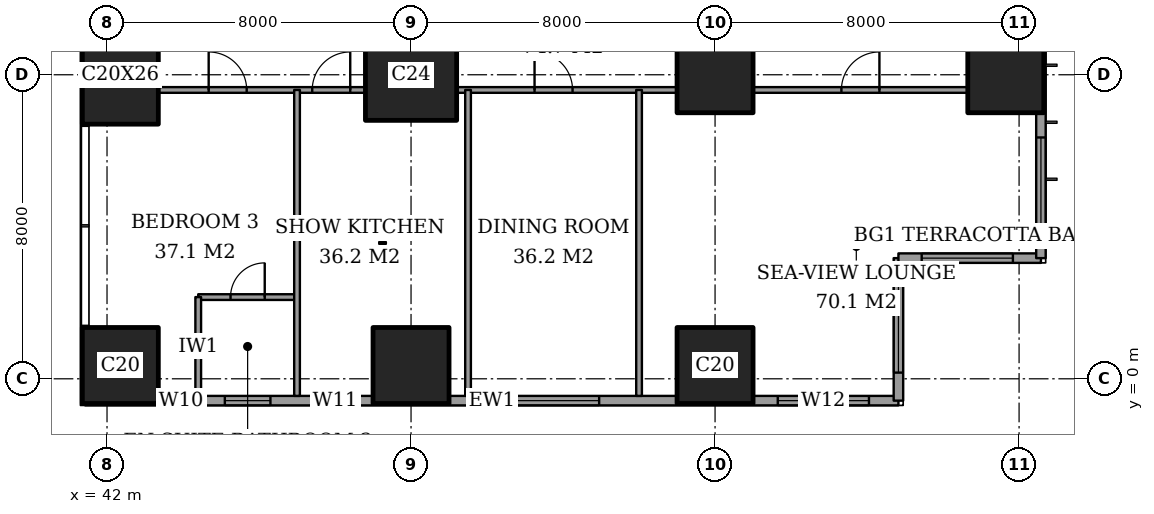
"""IFC4 building model, lengths in metres.
Left out: names, types, materials, properties, quantities, classifications, styles, units other than length and angle.
Written with IfcOpenShell. Run it as: python <this file> out.ifc"""

import sys

from ifc_helpers import new_model, si_unit, direction, frame, frame_2d, origin, origin_2d, place, context, subcontext, project, spatial, rectangle, extrude, element, fill, save


model = new_model("IFC4")
c1 = context("Model", 3, precision=1e-05, world=origin(), true_north=direction((0.0, 1.0)))
c2 = subcontext(c1, "Body", "Model", "MODEL_VIEW")
j1 = project(units=[si_unit("LENGTHUNIT", "METRE"), si_unit("PLANEANGLEUNIT", "RADIAN")], contexts=[c1])
p1 = place(None, origin())
s1 = spatial("IfcSite", under=j1, at=p1, CompositionType="ELEMENT")
p2 = place(p1, origin())
s2 = spatial("IfcBuilding", under=s1, at=p2, CompositionType="ELEMENT")
p3 = place(p2, frame((0.0, 0.0, 114.2)))
s3 = spatial("IfcBuildingStorey", under=s2, at=p3, CompositionType="ELEMENT", Elevation=114.2)
p4 = place(p3, frame((42.35, 0.35, 0.0), z_axis=(0.0, 0.0, 1.0), x_axis=(1.0, 0.0, 0.0)))
e1 = element("IfcColumn", 1, at=p4, inside=s3, PredefinedType="COLUMN", context=c2, shape_type="SweptSolid", body=[
    extrude(rectangle(XDim=2.0, YDim=2.0, at=origin_2d()), origin(), (0.0, 0.0, 1.0), 3.6),
])
p5 = place(p3, frame((42.35, 8.0, 0.0), z_axis=(0.0, 0.0, 1.0), x_axis=(1.0, 0.0, 0.0)))
e2 = element("IfcColumn", 2, at=p5, inside=s3, PredefinedType="COLUMN", context=c2, shape_type="SweptSolid", body=[
    extrude(rectangle(XDim=2.0, YDim=2.6, at=origin_2d()), origin(), (0.0, 0.0, 1.0), 3.6),
])
p6 = place(p3, frame((50.0, 0.35, 0.0), z_axis=(0.0, 0.0, 1.0), x_axis=(1.0, 0.0, 0.0)))
e3 = element("IfcColumn", 3, at=p6, inside=s3, PredefinedType="COLUMN", context=c2, shape_type="SweptSolid", body=[
    extrude(rectangle(XDim=2.0, YDim=2.0, at=origin_2d()), origin(), (0.0, 0.0, 1.0), 3.6),
])
p7 = place(p3, frame((50.0, 8.0, 0.0), z_axis=(0.0, 0.0, 1.0), x_axis=(1.0, 0.0, 0.0)))
e4 = element("IfcColumn", 4, at=p7, inside=s3, PredefinedType="COLUMN", context=c2, shape_type="SweptSolid", body=[
    extrude(rectangle(XDim=2.4, YDim=2.4, at=origin_2d()), origin(), (0.0, 0.0, 1.0), 3.6),
])
for number, where, z_axis, x_axis in (
    (5, (58.0, 0.35, 0.0), (0.0, 0.0, 1.0), (1.0, 0.0, 0.0)),
    (6, (58.0, 8.0, 0.0), (0.0, 0.0, 1.0), (1.0, 0.0, 0.0)),
    (7, (65.65, 8.0, 0.0), (0.0, 0.0, 1.0), (1.0, 0.0, 0.0)),
):
    element("IfcColumn", number, at=place(p3, frame(where, z_axis=z_axis, x_axis=x_axis)), inside=s3, PredefinedType="COLUMN", context=c2, shape_type="SweptSolid", body=[
        extrude(rectangle(XDim=2.0, YDim=2.0, at=origin_2d()), origin(), (0.0, 0.0, 1.0), 3.6),
    ])
p8 = place(p3, frame((41.425, -0.575, 0.0), z_axis=(0.0, 0.0, 1.0), x_axis=(1.0, 0.0, 0.0)))
e8 = element("IfcWall", 8, at=p8, inside=s3, PredefinedType="SOLIDWALL", context=c2, shape_type="SweptSolid", body=[
    extrude(rectangle(XDim=21.4, YDim=0.25, at=frame_2d((10.7, 0.0))), origin(), (0.0, 0.0, 1.0), 3.6),
])
p9 = place(p8, frame((2.225, 0.0, 0.4)))
e9 = element("IfcOpeningElement", 9, at=p9, cuts=e8, PredefinedType="OPENING", context=c2, shape_type="SweptSolid", body=[
    extrude(rectangle(XDim=0.6, YDim=2.2, at=frame_2d((0.3, 1.1))), frame((0.0, 0.135, 0.0), z_axis=(0.0, -1.0, 0.0), x_axis=(1.0, 0.0, 0.0)), (0.0, 0.0, 1.0), 0.27),
])
p10 = place(p8, frame((3.675, 0.0, 0.4)))
e10 = element("IfcOpeningElement", 10, at=p10, cuts=e8, PredefinedType="OPENING", context=c2, shape_type="SweptSolid", body=[
    extrude(rectangle(XDim=1.2, YDim=2.2, at=frame_2d((0.6, 1.1))), frame((0.0, 0.135, 0.0), z_axis=(0.0, -1.0, 0.0), x_axis=(1.0, 0.0, 0.0)), (0.0, 0.0, 1.0), 0.27),
])
p11 = place(p8, frame((5.975, 0.0, 0.4)))
e11 = element("IfcOpeningElement", 11, at=p11, cuts=e8, PredefinedType="OPENING", context=c2, shape_type="SweptSolid", body=[
    extrude(rectangle(XDim=1.2, YDim=2.2, at=frame_2d((0.6, 1.1))), frame((0.0, 0.135, 0.0), z_axis=(0.0, -1.0, 0.0), x_axis=(1.0, 0.0, 0.0)), (0.0, 0.0, 1.0), 0.27),
])
p12 = place(p8, frame((11.125, 0.0, 0.4)))
e12 = element("IfcOpeningElement", 12, at=p12, cuts=e8, PredefinedType="OPENING", context=c2, shape_type="SweptSolid", body=[
    extrude(rectangle(XDim=2.4, YDim=2.2, at=frame_2d((1.2, 1.1))), frame((0.0, 0.135, 0.0), z_axis=(0.0, -1.0, 0.0), x_axis=(1.0, 0.0, 0.0)), (0.0, 0.0, 1.0), 0.27),
])
p13 = place(p8, frame((18.225, 0.0, 0.4)))
e13 = element("IfcOpeningElement", 13, at=p13, cuts=e8, PredefinedType="OPENING", context=c2, shape_type="SweptSolid", body=[
    extrude(rectangle(XDim=2.4, YDim=2.2, at=frame_2d((1.2, 1.1))), frame((0.0, 0.135, 0.0), z_axis=(0.0, -1.0, 0.0), x_axis=(1.0, 0.0, 0.0)), (0.0, 0.0, 1.0), 0.27),
])
p14 = place(p3, frame((62.825, -0.575, 0.0), z_axis=(0.0, 0.0, 1.0), x_axis=(0.0, 1.0, 0.0)))
e14 = element("IfcWall", 14, at=p14, inside=s3, PredefinedType="SOLIDWALL", context=c2, shape_type="SweptSolid", body=[
    extrude(rectangle(XDim=3.75, YDim=0.25, at=frame_2d((1.875, 0.0))), origin(), (0.0, 0.0, 1.0), 3.6),
])
p15 = place(p14, frame((0.738, 0.0, 0.4)))
e15 = element("IfcOpeningElement", 15, at=p15, cuts=e14, PredefinedType="OPENING", context=c2, shape_type="SweptSolid", body=[
    extrude(rectangle(XDim=2.4, YDim=2.2, at=frame_2d((1.2, 1.1))), frame((0.0, 0.135, 0.0), z_axis=(0.0, -1.0, 0.0), x_axis=(1.0, 0.0, 0.0)), (0.0, 0.0, 1.0), 0.27),
])
p16 = place(p3, frame((62.825, 3.175, 0.0), z_axis=(0.0, 0.0, 1.0), x_axis=(1.0, 0.0, 0.0)))
e16 = element("IfcWall", 16, at=p16, inside=s3, PredefinedType="SOLIDWALL", context=c2, shape_type="SweptSolid", body=[
    extrude(rectangle(XDim=3.75, YDim=0.25, at=frame_2d((1.875, 0.0))), origin(), (0.0, 0.0, 1.0), 3.6),
])
p17 = place(p16, frame((0.613, 0.0, 0.4)))
e17 = element("IfcOpeningElement", 17, at=p17, cuts=e16, PredefinedType="OPENING", context=c2, shape_type="SweptSolid", body=[
    extrude(rectangle(XDim=2.4, YDim=2.2, at=frame_2d((1.2, 1.1))), frame((0.0, 0.135, 0.0), z_axis=(0.0, -1.0, 0.0), x_axis=(1.0, 0.0, 0.0)), (0.0, 0.0, 1.0), 0.27),
])
p18 = place(p3, frame((66.575, 3.175, 0.0), z_axis=(0.0, 0.0, 1.0), x_axis=(0.0, 1.0, 0.0)))
e18 = element("IfcWall", 18, at=p18, inside=s3, PredefinedType="SOLIDWALL", context=c2, shape_type="SweptSolid", body=[
    extrude(rectangle(XDim=41.65, YDim=0.25, at=frame_2d((20.825, 0.0))), origin(), (0.0, 0.0, 1.0), 3.6),
])
p19 = place(p18, frame((0.775, 0.0, 0.4)))
e19 = element("IfcOpeningElement", 19, at=p19, cuts=e18, PredefinedType="OPENING", context=c2, shape_type="SweptSolid", body=[
    extrude(rectangle(XDim=2.4, YDim=2.2, at=frame_2d((1.2, 1.1))), frame((0.0, 0.135, 0.0), z_axis=(0.0, -1.0, 0.0), x_axis=(1.0, 0.0, 0.0)), (0.0, 0.0, 1.0), 0.27),
])
p20 = place(p18, frame((6.1, 0.0, 0.4)))
e20 = element("IfcOpeningElement", 20, at=p20, cuts=e18, PredefinedType="OPENING", context=c2, shape_type="SweptSolid", body=[
    extrude(rectangle(XDim=1.2, YDim=2.2, at=frame_2d((0.6, 1.1))), frame((0.0, 0.135, 0.0), z_axis=(0.0, -1.0, 0.0), x_axis=(1.0, 0.0, 0.0)), (0.0, 0.0, 1.0), 0.27),
])
p21 = place(p18, frame((8.275, 0.0, 0.4)))
e21 = element("IfcOpeningElement", 21, at=p21, cuts=e18, PredefinedType="OPENING", context=c2, shape_type="SweptSolid", body=[
    extrude(rectangle(XDim=2.4, YDim=2.2, at=frame_2d((1.2, 1.1))), frame((0.0, 0.135, 0.0), z_axis=(0.0, -1.0, 0.0), x_axis=(1.0, 0.0, 0.0)), (0.0, 0.0, 1.0), 0.27),
])
p22 = place(p18, frame((15.775, 0.0, 0.4)))
e22 = element("IfcOpeningElement", 22, at=p22, cuts=e18, PredefinedType="OPENING", context=c2, shape_type="SweptSolid", body=[
    extrude(rectangle(XDim=2.4, YDim=2.2, at=frame_2d((1.2, 1.1))), frame((0.0, 0.135, 0.0), z_axis=(0.0, -1.0, 0.0), x_axis=(1.0, 0.0, 0.0)), (0.0, 0.0, 1.0), 0.27),
])
p23 = place(p18, frame((23.475, 0.0, 0.4)))
e23 = element("IfcOpeningElement", 23, at=p23, cuts=e18, PredefinedType="OPENING", context=c2, shape_type="SweptSolid", body=[
    extrude(rectangle(XDim=2.4, YDim=2.2, at=frame_2d((1.2, 1.1))), frame((0.0, 0.135, 0.0), z_axis=(0.0, -1.0, 0.0), x_axis=(1.0, 0.0, 0.0)), (0.0, 0.0, 1.0), 0.27),
])
p24 = place(p18, frame((30.975, 0.0, 0.4)))
e24 = element("IfcOpeningElement", 24, at=p24, cuts=e18, PredefinedType="OPENING", context=c2, shape_type="SweptSolid", body=[
    extrude(rectangle(XDim=2.4, YDim=2.2, at=frame_2d((1.2, 1.1))), frame((0.0, 0.135, 0.0), z_axis=(0.0, -1.0, 0.0), x_axis=(1.0, 0.0, 0.0)), (0.0, 0.0, 1.0), 0.27),
])
p25 = place(p18, frame((34.5, 0.0, 0.4)))
e25 = element("IfcOpeningElement", 25, at=p25, cuts=e18, PredefinedType="OPENING", context=c2, shape_type="SweptSolid", body=[
    extrude(rectangle(XDim=1.2, YDim=2.2, at=frame_2d((0.6, 1.1))), frame((0.0, 0.135, 0.0), z_axis=(0.0, -1.0, 0.0), x_axis=(1.0, 0.0, 0.0)), (0.0, 0.0, 1.0), 0.27),
])
p26 = place(p18, frame((38.475, 0.0, 0.4)))
e26 = element("IfcOpeningElement", 26, at=p26, cuts=e18, PredefinedType="OPENING", context=c2, shape_type="SweptSolid", body=[
    extrude(rectangle(XDim=2.4, YDim=2.2, at=frame_2d((1.2, 1.1))), frame((0.0, 0.135, 0.0), z_axis=(0.0, -1.0, 0.0), x_axis=(1.0, 0.0, 0.0)), (0.0, 0.0, 1.0), 0.27),
])
p27 = place(p3, frame((44.4, 2.15, 0.0), z_axis=(0.0, 0.0, 1.0), x_axis=(1.0, 0.0, 0.0)))
e27 = element("IfcWall", 27, at=p27, inside=s3, PredefinedType="PARTITIONING", context=c2, shape_type="SweptSolid", body=[
    extrude(rectangle(XDim=2.6, YDim=0.15, at=frame_2d((1.3, 0.0))), origin(), (0.0, 0.0, 1.0), 3.35),
])
p28 = place(p27, frame((0.85, 0.0, 0.0)))
e28 = element("IfcOpeningElement", 28, at=p28, cuts=e27, PredefinedType="OPENING", context=c2, shape_type="SweptSolid", body=[
    extrude(rectangle(XDim=0.9, YDim=2.1, at=frame_2d((0.45, 1.05))), frame((0.0, 0.085, 0.0), z_axis=(0.0, -1.0, 0.0), x_axis=(1.0, 0.0, 0.0)), (0.0, 0.0, 1.0), 0.17),
])
p29 = place(p3, frame((43.35, 7.6, 0.0), z_axis=(0.0, 0.0, 1.0), x_axis=(1.0, 0.0, 0.0)))
e29 = element("IfcWall", 29, at=p29, inside=s3, PredefinedType="PARTITIONING", context=c2, shape_type="SweptSolid", body=[
    extrude(rectangle(XDim=5.45, YDim=0.15, at=frame_2d((2.725, 0.0))), origin(), (0.0, 0.0, 1.0), 3.35),
])
p30 = place(p29, frame((4.05, 0.0, 0.0)))
e30 = element("IfcOpeningElement", 30, at=p30, cuts=e29, PredefinedType="OPENING", context=c2, shape_type="SweptSolid", body=[
    extrude(rectangle(XDim=1.0, YDim=2.1, at=frame_2d((0.5, 1.05))), frame((0.0, 0.085, 0.0), z_axis=(0.0, -1.0, 0.0), x_axis=(1.0, 0.0, 0.0)), (0.0, 0.0, 1.0), 0.17),
])
p31 = place(p29, frame((1.325, 0.0, 0.0)))
e31 = element("IfcOpeningElement", 31, at=p31, cuts=e29, PredefinedType="OPENING", context=c2, shape_type="SweptSolid", body=[
    extrude(rectangle(XDim=1.0, YDim=2.1, at=frame_2d((0.5, 1.05))), frame((0.0, 0.085, 0.0), z_axis=(0.0, -1.0, 0.0), x_axis=(1.0, 0.0, 0.0)), (0.0, 0.0, 1.0), 0.17),
])
p32 = place(p3, frame((51.2, 7.6, 0.0), z_axis=(0.0, 0.0, 1.0), x_axis=(1.0, 0.0, 0.0)))
e32 = element("IfcWall", 32, at=p32, inside=s3, PredefinedType="PARTITIONING", context=c2, shape_type="SweptSolid", body=[
    extrude(rectangle(XDim=5.8, YDim=0.15, at=frame_2d((2.9, 0.0))), origin(), (0.0, 0.0, 1.0), 3.35),
])
p33 = place(p32, frame((2.05, 0.0, 0.0)))
e33 = element("IfcOpeningElement", 33, at=p33, cuts=e32, PredefinedType="OPENING", context=c2, shape_type="SweptSolid", body=[
    extrude(rectangle(XDim=1.0, YDim=2.1, at=frame_2d((0.5, 1.05))), frame((0.0, 0.085, 0.0), z_axis=(0.0, -1.0, 0.0), x_axis=(1.0, 0.0, 0.0)), (0.0, 0.0, 1.0), 0.17),
])
p34 = place(p3, frame((59.0, 7.6, 0.0), z_axis=(0.0, 0.0, 1.0), x_axis=(1.0, 0.0, 0.0)))
e34 = element("IfcWall", 34, at=p34, inside=s3, PredefinedType="PARTITIONING", context=c2, shape_type="SweptSolid", body=[
    extrude(rectangle(XDim=5.65, YDim=0.15, at=frame_2d((2.825, 0.0))), origin(), (0.0, 0.0, 1.0), 3.35),
])
p35 = place(p34, frame((2.325, 0.0, 0.0)))
e35 = element("IfcOpeningElement", 35, at=p35, cuts=e34, PredefinedType="OPENING", context=c2, shape_type="SweptSolid", body=[
    extrude(rectangle(XDim=1.0, YDim=2.1, at=frame_2d((0.5, 1.05))), frame((0.0, 0.085, 0.0), z_axis=(0.0, -1.0, 0.0), x_axis=(1.0, 0.0, 0.0)), (0.0, 0.0, 1.0), 0.17),
])
p36 = place(p3, frame((44.4, -0.45, 0.0), z_axis=(0.0, 0.0, 1.0), x_axis=(0.0, 1.0, 0.0)))
e36 = element("IfcWall", 36, at=p36, inside=s3, PredefinedType="PARTITIONING", context=c2, shape_type="SweptSolid", body=[
    extrude(rectangle(XDim=2.6, YDim=0.15, at=frame_2d((1.3, 0.0))), origin(), (0.0, 0.0, 1.0), 3.35),
])
for number, where, z_axis, x_axis in (
    (37, (47.0, -0.45, 0.0), (0.0, 0.0, 1.0), (0.0, 1.0, 0.0)),
    (38, (51.5, -0.45, 0.0), (0.0, 0.0, 1.0), (0.0, 1.0, 0.0)),
    (39, (56.0, -0.45, 0.0), (0.0, 0.0, 1.0), (0.0, 1.0, 0.0)),
):
    element("IfcWall", number, at=place(p3, frame(where, z_axis=z_axis, x_axis=x_axis)), inside=s3, PredefinedType="PARTITIONING", context=c2, shape_type="SweptSolid", body=[
        extrude(rectangle(XDim=8.05, YDim=0.15, at=frame_2d((4.025, 0.0))), origin(), (0.0, 0.0, 1.0), 3.35),
    ])
p37 = place(p9, origin())
e40 = element("IfcWindow", 40, at=p37, inside=s3, PartitioningType="SINGLE_PANEL", PredefinedType="WINDOW", context=c2, shape_type="SweptSolid", body=[
    extrude(rectangle(XDim=0.6, YDim=2.2, at=frame_2d((0.3, 1.1))), frame((0.0, 0.03, 0.0), z_axis=(0.0, -1.0, 0.0), x_axis=(1.0, 0.0, 0.0)), (0.0, 0.0, 1.0), 0.06),
])
fill(e9, e40)
p38 = place(p10, origin())
e41 = element("IfcWindow", 41, at=p38, inside=s3, PartitioningType="SINGLE_PANEL", PredefinedType="WINDOW", context=c2, shape_type="SweptSolid", body=[
    extrude(rectangle(XDim=1.2, YDim=2.2, at=frame_2d((0.6, 1.1))), frame((0.0, 0.03, 0.0), z_axis=(0.0, -1.0, 0.0), x_axis=(1.0, 0.0, 0.0)), (0.0, 0.0, 1.0), 0.06),
])
fill(e10, e41)
p39 = place(p11, origin())
e42 = element("IfcWindow", 42, at=p39, inside=s3, PartitioningType="SINGLE_PANEL", PredefinedType="WINDOW", context=c2, shape_type="SweptSolid", body=[
    extrude(rectangle(XDim=1.2, YDim=2.2, at=frame_2d((0.6, 1.1))), frame((0.0, 0.03, 0.0), z_axis=(0.0, -1.0, 0.0), x_axis=(1.0, 0.0, 0.0)), (0.0, 0.0, 1.0), 0.06),
])
fill(e11, e42)
p40 = place(p12, origin())
e43 = element("IfcWindow", 43, at=p40, inside=s3, PartitioningType="SINGLE_PANEL", PredefinedType="WINDOW", context=c2, shape_type="SweptSolid", body=[
    extrude(rectangle(XDim=2.4, YDim=2.2, at=frame_2d((1.2, 1.1))), frame((0.0, 0.03, 0.0), z_axis=(0.0, -1.0, 0.0), x_axis=(1.0, 0.0, 0.0)), (0.0, 0.0, 1.0), 0.06),
])
fill(e12, e43)
p41 = place(p13, origin())
e44 = element("IfcWindow", 44, at=p41, inside=s3, PartitioningType="SINGLE_PANEL", PredefinedType="WINDOW", context=c2, shape_type="SweptSolid", body=[
    extrude(rectangle(XDim=2.4, YDim=2.2, at=frame_2d((1.2, 1.1))), frame((0.0, 0.03, 0.0), z_axis=(0.0, -1.0, 0.0), x_axis=(1.0, 0.0, 0.0)), (0.0, 0.0, 1.0), 0.06),
])
fill(e13, e44)
p42 = place(p15, origin())
e45 = element("IfcWindow", 45, at=p42, inside=s3, PartitioningType="SINGLE_PANEL", PredefinedType="WINDOW", context=c2, shape_type="SweptSolid", body=[
    extrude(rectangle(XDim=2.4, YDim=2.2, at=frame_2d((1.2, 1.1))), frame((0.0, 0.03, 0.0), z_axis=(0.0, -1.0, 0.0), x_axis=(1.0, 0.0, 0.0)), (0.0, 0.0, 1.0), 0.06),
])
fill(e15, e45)
p43 = place(p17, origin())
e46 = element("IfcWindow", 46, at=p43, inside=s3, PartitioningType="SINGLE_PANEL", PredefinedType="WINDOW", context=c2, shape_type="SweptSolid", body=[
    extrude(rectangle(XDim=2.4, YDim=2.2, at=frame_2d((1.2, 1.1))), frame((0.0, 0.03, 0.0), z_axis=(0.0, -1.0, 0.0), x_axis=(1.0, 0.0, 0.0)), (0.0, 0.0, 1.0), 0.06),
])
fill(e17, e46)
p44 = place(p19, origin())
e47 = element("IfcWindow", 47, at=p44, inside=s3, PartitioningType="SINGLE_PANEL", PredefinedType="WINDOW", context=c2, shape_type="SweptSolid", body=[
    extrude(rectangle(XDim=2.4, YDim=2.2, at=frame_2d((1.2, 1.1))), frame((0.0, 0.03, 0.0), z_axis=(0.0, -1.0, 0.0), x_axis=(1.0, 0.0, 0.0)), (0.0, 0.0, 1.0), 0.06),
])
fill(e19, e47)
p45 = place(p35, origin())
e48 = element("IfcDoor", 48, at=p45, inside=s3, OperationType="SINGLE_SWING_LEFT", PredefinedType="DOOR", context=c2, shape_type="SweptSolid", body=[
    extrude(rectangle(XDim=1.0, YDim=2.1, at=frame_2d((0.5, 1.05))), frame((0.0, 0.025, 0.0), z_axis=(0.0, -1.0, 0.0), x_axis=(1.0, 0.0, 0.0)), (0.0, 0.0, 1.0), 0.05),
])
fill(e35, e48)
p46 = place(p33, origin())
e49 = element("IfcDoor", 49, at=p46, inside=s3, OperationType="SINGLE_SWING_RIGHT", PredefinedType="DOOR", context=c2, shape_type="SweptSolid", body=[
    extrude(rectangle(XDim=1.0, YDim=2.1, at=frame_2d((0.5, 1.05))), frame((0.0, 0.025, 0.0), z_axis=(0.0, -1.0, 0.0), x_axis=(1.0, 0.0, 0.0)), (0.0, 0.0, 1.0), 0.05),
])
fill(e33, e49)
p47 = place(p30, origin())
e50 = element("IfcDoor", 50, at=p47, inside=s3, OperationType="SINGLE_SWING_LEFT", PredefinedType="DOOR", context=c2, shape_type="SweptSolid", body=[
    extrude(rectangle(XDim=1.0, YDim=2.1, at=frame_2d((0.5, 1.05))), frame((0.0, 0.025, 0.0), z_axis=(0.0, -1.0, 0.0), x_axis=(1.0, 0.0, 0.0)), (0.0, 0.0, 1.0), 0.05),
])
fill(e30, e50)
p48 = place(p28, origin())
e51 = element("IfcDoor", 51, at=p48, inside=s3, OperationType="SINGLE_SWING_LEFT", PredefinedType="DOOR", context=c2, shape_type="SweptSolid", body=[
    extrude(rectangle(XDim=0.9, YDim=2.1, at=frame_2d((0.45, 1.05))), frame((0.0, 0.025, 0.0), z_axis=(0.0, -1.0, 0.0), x_axis=(1.0, 0.0, 0.0)), (0.0, 0.0, 1.0), 0.05),
])
fill(e28, e51)
p49 = place(p31, origin())
e52 = element("IfcDoor", 52, at=p49, inside=s3, OperationType="SINGLE_SWING_RIGHT", PredefinedType="DOOR", context=c2, shape_type="SweptSolid", body=[
    extrude(rectangle(XDim=1.0, YDim=2.1, at=frame_2d((0.5, 1.05))), frame((0.0, 0.025, 0.0), z_axis=(0.0, -1.0, 0.0), x_axis=(1.0, 0.0, 0.0)), (0.0, 0.0, 1.0), 0.05),
])
fill(e31, e52)
save(model, sys.argv[1])
